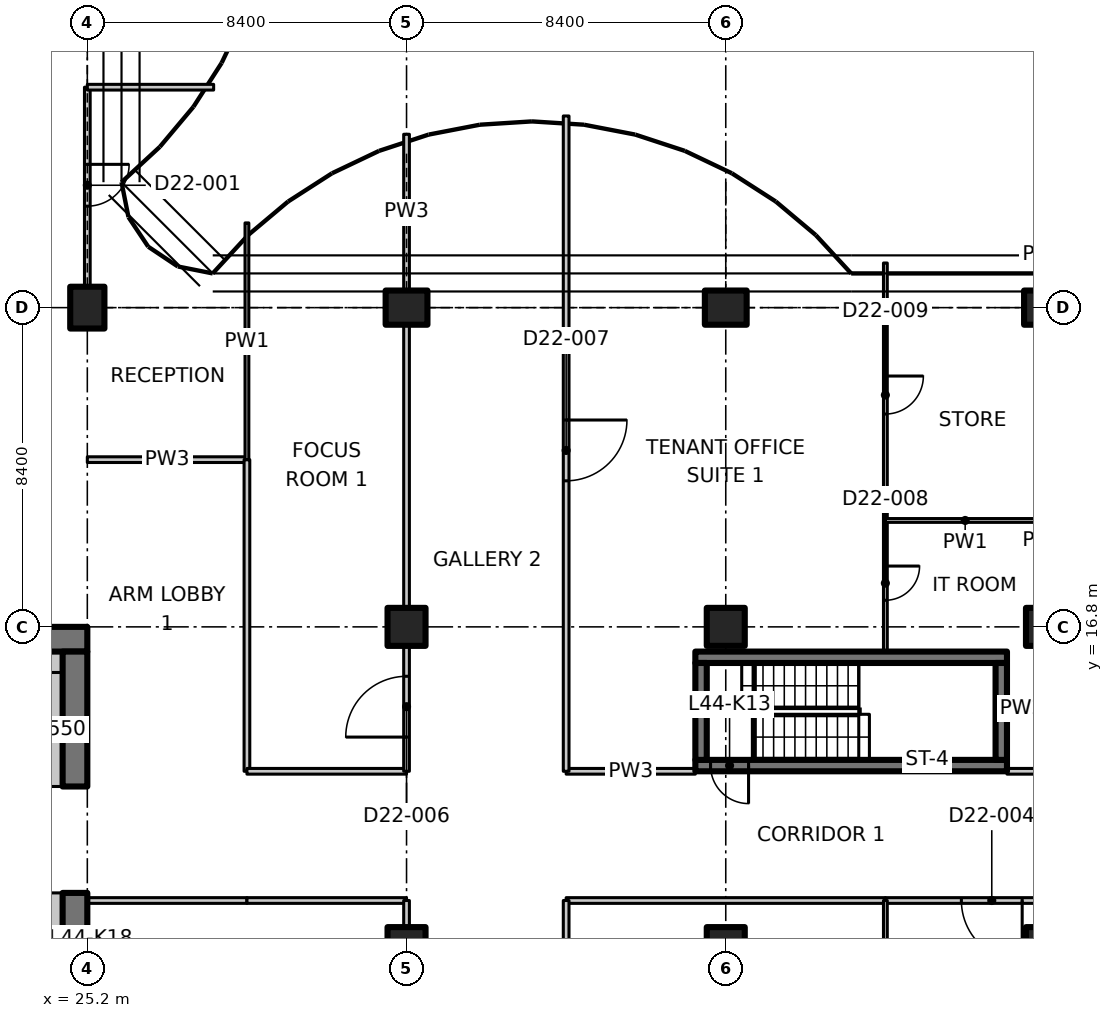
"""IFC4 building model, lengths in metres.
Left out: names, types, materials, properties, quantities, classifications, styles, units other than length and angle.
Written with IfcOpenShell. Run it as: python <this file> out.ifc"""

import sys

from ifc_helpers import new_model, si_unit, direction, frame, frame_2d, origin, origin_2d, place, context, subcontext, project, spatial, polyline, rectangle, outline, extrude, element, fill, save


model = new_model("IFC4")
c1 = context("Model", 3, precision=1e-05, world=origin(), true_north=direction((0.0, 1.0)))
c2 = subcontext(c1, "Body", "Model", "MODEL_VIEW")
j1 = project(units=[si_unit("LENGTHUNIT", "METRE"), si_unit("PLANEANGLEUNIT", "RADIAN")], contexts=[c1])
p1 = place(None, origin())
s1 = spatial("IfcSite", under=j1, at=p1, CompositionType="ELEMENT")
p2 = place(p1, origin())
s2 = spatial("IfcBuilding", under=s1, at=p2, CompositionType="ELEMENT")
p3 = place(p2, frame((0.0, 0.0, 177.6)))
s3 = spatial("IfcBuildingStorey", under=s2, at=p3, CompositionType="ELEMENT", Elevation=177.6)
p4 = place(p3, frame((25.2, 25.2, 0.0), z_axis=(0.0, 0.0, 1.0), x_axis=(1.0, 0.0, 0.0)))
e1 = element("IfcColumn", 1, at=p4, inside=s3, PredefinedType="COLUMN", context=c2, shape_type="SweptSolid", body=[
    extrude(rectangle(XDim=0.9, YDim=1.1, at=origin_2d()), origin(), (0.0, 0.0, 1.0), 3.35),
])
for number, where, z_axis, x_axis in (
    (2, (33.6, 8.4, 0.0), (0.0, 0.0, 1.0), (1.0, 0.0, 0.0)),
    (3, (33.6, 16.8, 0.0), (0.0, 0.0, 1.0), (1.0, 0.0, 0.0)),
):
    element("IfcColumn", number, at=place(p3, frame(where, z_axis=z_axis, x_axis=x_axis)), inside=s3, PredefinedType="COLUMN", context=c2, shape_type="SweptSolid", body=[
        extrude(rectangle(XDim=1.0, YDim=1.0, at=origin_2d()), origin(), (0.0, 0.0, 1.0), 3.35),
    ])
p5 = place(p3, frame((33.6, 25.2, 0.0), z_axis=(0.0, 0.0, 1.0), x_axis=(0.0, 1.0, 0.0)))
e4 = element("IfcColumn", 4, at=p5, inside=s3, PredefinedType="COLUMN", context=c2, shape_type="SweptSolid", body=[
    extrude(rectangle(XDim=0.9, YDim=1.1, at=origin_2d()), origin(), (0.0, 0.0, 1.0), 3.35),
])
for number, where, z_axis, x_axis in (
    (5, (42.0, 8.4, 0.0), (0.0, 0.0, 1.0), (1.0, 0.0, 0.0)),
    (6, (42.0, 16.8, 0.0), (0.0, 0.0, 1.0), (1.0, 0.0, 0.0)),
):
    element("IfcColumn", number, at=place(p3, frame(where, z_axis=z_axis, x_axis=x_axis)), inside=s3, PredefinedType="COLUMN", context=c2, shape_type="SweptSolid", body=[
        extrude(rectangle(XDim=1.0, YDim=1.0, at=origin_2d()), origin(), (0.0, 0.0, 1.0), 3.35),
    ])
p6 = place(p3, frame((42.0, 25.2, 0.0), z_axis=(0.0, 0.0, 1.0), x_axis=(0.0, 1.0, 0.0)))
e7 = element("IfcColumn", 7, at=p6, inside=s3, PredefinedType="COLUMN", context=c2, shape_type="SweptSolid", body=[
    extrude(rectangle(XDim=0.9, YDim=1.1, at=origin_2d()), origin(), (0.0, 0.0, 1.0), 3.35),
])
for number, where, z_axis, x_axis in (
    (8, (50.4, 8.4, 0.0), (0.0, 0.0, 1.0), (1.0, 0.0, 0.0)),
    (9, (50.4, 16.8, 0.0), (0.0, 0.0, 1.0), (1.0, 0.0, 0.0)),
):
    element("IfcColumn", number, at=place(p3, frame(where, z_axis=z_axis, x_axis=x_axis)), inside=s3, PredefinedType="COLUMN", context=c2, shape_type="SweptSolid", body=[
        extrude(rectangle(XDim=1.0, YDim=1.0, at=origin_2d()), origin(), (0.0, 0.0, 1.0), 3.35),
    ])
p7 = place(p3, frame((50.4, 25.2, 0.0), z_axis=(0.0, 0.0, 1.0), x_axis=(0.0, 1.0, 0.0)))
e10 = element("IfcColumn", 10, at=p7, inside=s3, PredefinedType="COLUMN", context=c2, shape_type="SweptSolid", body=[
    extrude(rectangle(XDim=0.9, YDim=1.1, at=origin_2d()), origin(), (0.0, 0.0, 1.0), 3.35),
])
p8 = place(p3, frame((23.8, 16.475, 0.0), z_axis=(0.0, 0.0, 1.0), x_axis=(1.0, 0.0, 0.0)))
e11 = element("IfcWall", 11, at=p8, inside=s3, PredefinedType="SHEAR", context=c2, shape_type="SweptSolid", body=[
    extrude(rectangle(XDim=1.4, YDim=0.65, at=frame_2d((0.7, 0.0))), origin(), (0.0, 0.0, 1.0), 3.35),
])
p9 = place(p3, frame((24.875, 0.65, 0.0), z_axis=(0.0, 0.0, 1.0), x_axis=(0.0, 1.0, 0.0)))
e12 = element("IfcWall", 12, at=p9, inside=s3, PredefinedType="SHEAR", context=c2, shape_type="SweptSolid", body=[
    extrude(rectangle(XDim=9.15, YDim=0.65, at=frame_2d((4.575, 0.0))), origin(), (0.0, 0.0, 1.0), 3.35),
])
p10 = place(p3, frame((24.875, 12.6, 0.0), z_axis=(0.0, 0.0, 1.0), x_axis=(0.0, 1.0, 0.0)))
e13 = element("IfcWall", 13, at=p10, inside=s3, PredefinedType="SHEAR", context=c2, shape_type="SweptSolid", body=[
    extrude(rectangle(XDim=3.55, YDim=0.65, at=frame_2d((1.775, 0.0))), origin(), (0.0, 0.0, 1.0), 3.35),
])
p11 = place(p3, frame((24.275, 12.6, 0.0), z_axis=(0.0, 0.0, 1.0), x_axis=(0.0, 1.0, 0.0)))
e14 = element("IfcWall", 14, at=p11, inside=s3, PredefinedType="PARTITIONING", context=c2, shape_type="SweptSolid", body=[
    extrude(rectangle(XDim=3.0, YDim=0.55, at=frame_2d((1.5, 0.0))), origin(), (0.0, 0.0, 1.0), 3.35),
])
p12 = place(p3, frame((23.8, 15.875, 0.0), z_axis=(0.0, 0.0, 1.0), x_axis=(1.0, 0.0, 0.0)))
e15 = element("IfcWall", 15, at=p12, inside=s3, PredefinedType="PARTITIONING", context=c2, shape_type="SweptSolid", body=[
    extrude(rectangle(XDim=0.75, YDim=0.55, at=frame_2d((0.375, 0.0))), origin(), (0.0, 0.0, 1.0), 3.35),
])
p13 = place(p3, frame((49.4, 13.15, 0.0), z_axis=(0.0, 0.0, 1.0), x_axis=(-1.0, 0.0, 0.0)))
e16 = element("IfcWall", 16, at=p13, inside=s3, PredefinedType="SHEAR", context=c2, shape_type="SweptSolid", body=[
    extrude(rectangle(XDim=8.2, YDim=0.3, at=frame_2d((4.1, 0.0))), origin(), (0.0, 0.0, 1.0), 3.35),
])
p14 = place(p13, frame((6.8, 0.0, 0.0)))
e17 = element("IfcOpeningElement", 17, at=p14, cuts=e16, PredefinedType="OPENING", context=c2, shape_type="SweptSolid", body=[
    extrude(rectangle(XDim=1.0, YDim=2.1, at=frame_2d((0.5, 1.05))), frame((0.0, 0.16, 0.0), z_axis=(0.0, -1.0, 0.0), x_axis=(1.0, 0.0, 0.0)), (0.0, 0.0, 1.0), 0.32),
])
p15 = place(p3, frame((41.2, 16.0, 0.0), z_axis=(0.0, 0.0, 1.0), x_axis=(1.0, 0.0, 0.0)))
e18 = element("IfcWall", 18, at=p15, inside=s3, PredefinedType="SHEAR", context=c2, shape_type="SweptSolid", body=[
    extrude(rectangle(XDim=8.2, YDim=0.3, at=frame_2d((4.1, 0.0))), origin(), (0.0, 0.0, 1.0), 3.35),
])
for number, where, z_axis, x_axis in (
    (19, (41.35, 13.3, 0.0), (0.0, 0.0, 1.0), (0.0, 1.0, 0.0)),
    (20, (49.25, 13.3, 0.0), (0.0, 0.0, 1.0), (0.0, 1.0, 0.0)),
):
    element("IfcWall", number, at=place(p3, frame(where, z_axis=z_axis, x_axis=x_axis)), inside=s3, PredefinedType="SHEAR", context=c2, shape_type="SweptSolid", body=[
        extrude(rectangle(XDim=2.55, YDim=0.3, at=frame_2d((1.275, 0.0))), origin(), (0.0, 0.0, 1.0), 3.35),
    ])
p16 = place(p3, frame((24.275, 4.35, 0.0), z_axis=(0.0, 0.0, 1.0), x_axis=(0.0, 1.0, 0.0)))
e21 = element("IfcWall", 21, at=p16, inside=s3, PredefinedType="PARTITIONING", context=c2, shape_type="SweptSolid", body=[
    extrude(rectangle(XDim=5.45, YDim=0.55, at=frame_2d((2.725, 0.0))), origin(), (0.0, 0.0, 1.0), 3.35),
])
for number, where, z_axis, x_axis in (
    (22, (25.2, 21.2, 0.0), (0.0, 0.0, 1.0), (1.0, 0.0, 0.0)),
    (23, (29.4, 9.6, 0.0), (0.0, 0.0, 1.0), (-1.0, 0.0, 0.0)),
):
    element("IfcWall", number, at=place(p3, frame(where, z_axis=z_axis, x_axis=x_axis)), inside=s3, PredefinedType="PARTITIONING", context=c2, shape_type="SweptSolid", body=[
        extrude(rectangle(XDim=4.2, YDim=0.15, at=frame_2d((2.1, 0.0))), origin(), (0.0, 0.0, 1.0), 3.33),
    ])
p17 = place(p3, frame((29.4, 21.2, 0.0), z_axis=(0.0, 0.0, 1.0), x_axis=(0.0, -1.0, 0.0)))
e24 = element("IfcWall", 24, at=p17, inside=s3, PredefinedType="PARTITIONING", context=c2, shape_type="SweptSolid", body=[
    extrude(rectangle(XDim=8.2, YDim=0.15, at=frame_2d((4.1, 0.0))), origin(), (0.0, 0.0, 1.0), 3.33),
])
p18 = place(p3, frame((29.4, 27.429, 0.0), z_axis=(0.0, 0.0, 1.0), x_axis=(0.0, -1.0, 0.0)))
e25 = element("IfcWall", 25, at=p18, inside=s3, PredefinedType="PARTITIONING", context=c2, shape_type="SweptSolid", body=[
    extrude(outline(polyline([(0.0, 0.0), (6.229, 0.0), (6.229, 3.33), (2.679, 3.33), (2.677, 2.98), (1.781, 2.98), (1.779, 3.33), (0.154, 3.33), (0.0, 3.33), (0.0, 0.0)])), frame((0.0, 0.05, 0.0), z_axis=(0.0, -1.0, 0.0), x_axis=(1.0, 0.0, 0.0)), (0.0, 0.0, 1.0), 0.1),
])
p19 = place(p3, frame((25.2, 31.0, 0.0), z_axis=(0.0, 0.0, 1.0), x_axis=(0.0, -1.0, 0.0)))
e26 = element("IfcWall", 26, at=p19, inside=s3, PredefinedType="PARTITIONING", context=c2, shape_type="SweptSolid", body=[
    extrude(outline(polyline([(0.0, 0.0), (5.23, 0.0), (5.23, 2.98), (0.0, 2.98), (0.0, 0.0)])), frame((0.0, 0.075, 0.0), z_axis=(0.0, -1.0, 0.0), x_axis=(1.0, 0.0, 0.0)), (0.0, 0.0, 1.0), 0.15),
])
p20 = place(p19, frame((2.03, 0.0, 0.0)))
e27 = element("IfcOpeningElement", 27, at=p20, cuts=e26, PredefinedType="OPENING", context=c2, shape_type="SweptSolid", body=[
    extrude(rectangle(XDim=1.1, YDim=2.1, at=frame_2d((0.55, 1.05))), frame((0.0, 0.085, 0.0), z_axis=(0.0, -1.0, 0.0), x_axis=(1.0, 0.0, 0.0)), (0.0, 0.0, 1.0), 0.17),
])
p21 = place(p3, frame((25.2, 31.0, 0.0), z_axis=(0.0, 0.0, 1.0), x_axis=(1.0, 0.0, 0.0)))
e28 = element("IfcWall", 28, at=p21, inside=s3, PredefinedType="PARTITIONING", context=c2, shape_type="SweptSolid", body=[
    extrude(rectangle(XDim=3.324, YDim=0.15, at=frame_2d((1.662, 0.0))), origin(), (0.0, 0.0, 1.0), 2.98),
])
p22 = place(p3, frame((33.6, 9.6, 0.0), z_axis=(0.0, 0.0, 1.0), x_axis=(-1.0, 0.0, 0.0)))
e29 = element("IfcWall", 29, at=p22, inside=s3, PredefinedType="PARTITIONING", context=c2, shape_type="SweptSolid", body=[
    extrude(rectangle(XDim=4.2, YDim=0.15, at=frame_2d((2.1, 0.0))), origin(), (0.0, 0.0, 1.0), 3.33),
])
p23 = place(p3, frame((46.2, 9.6, 0.0), z_axis=(0.0, 0.0, 1.0), x_axis=(-1.0, 0.0, 0.0)))
e30 = element("IfcWall", 30, at=p23, inside=s3, PredefinedType="PARTITIONING", context=c2, shape_type="SweptSolid", body=[
    extrude(rectangle(XDim=8.4, YDim=0.15, at=frame_2d((4.2, 0.0))), origin(), (0.0, 0.0, 1.0), 3.33),
])
p24 = place(p3, frame((54.6, 9.6, 0.0), z_axis=(0.0, 0.0, 1.0), x_axis=(-1.0, 0.0, 0.0)))
e31 = element("IfcWall", 31, at=p24, inside=s3, PredefinedType="PARTITIONING", context=c2, shape_type="SweptSolid", body=[
    extrude(rectangle(XDim=8.4, YDim=0.15, at=frame_2d((4.2, 0.0))), origin(), (0.0, 0.0, 1.0), 3.33),
])
p25 = place(p24, frame((4.8, 0.0, 0.0)))
e32 = element("IfcOpeningElement", 32, at=p25, cuts=e31, PredefinedType="OPENING", context=c2, shape_type="SweptSolid", body=[
    extrude(rectangle(XDim=1.6, YDim=2.1, at=frame_2d((0.8, 1.05))), frame((0.0, 0.085, 0.0), z_axis=(0.0, -1.0, 0.0), x_axis=(1.0, 0.0, 0.0)), (0.0, 0.0, 1.0), 0.17),
])
p26 = place(p3, frame((29.4, 13.0, 0.0), z_axis=(0.0, 0.0, 1.0), x_axis=(1.0, 0.0, 0.0)))
e33 = element("IfcWall", 33, at=p26, inside=s3, PredefinedType="PARTITIONING", context=c2, shape_type="SweptSolid", body=[
    extrude(rectangle(XDim=4.2, YDim=0.15, at=frame_2d((2.1, 0.0))), origin(), (0.0, 0.0, 1.0), 3.33),
])
p27 = place(p3, frame((37.8, 13.0, 0.0), z_axis=(0.0, 0.0, 1.0), x_axis=(1.0, 0.0, 0.0)))
e34 = element("IfcWall", 34, at=p27, inside=s3, PredefinedType="PARTITIONING", context=c2, shape_type="SweptSolid", body=[
    extrude(rectangle(XDim=3.4, YDim=0.15, at=frame_2d((1.7, 0.0))), origin(), (0.0, 0.0, 1.0), 3.33),
])
p28 = place(p3, frame((49.4, 13.0, 0.0), z_axis=(0.0, 0.0, 1.0), x_axis=(1.0, 0.0, 0.0)))
e35 = element("IfcWall", 35, at=p28, inside=s3, PredefinedType="PARTITIONING", context=c2, shape_type="SweptSolid", body=[
    extrude(rectangle(XDim=1.0, YDim=0.15, at=frame_2d((0.5, 0.0))), origin(), (0.0, 0.0, 1.0), 3.33),
])
p29 = place(p3, frame((33.6, 8.92, 0.0), z_axis=(0.0, 0.0, 1.0), x_axis=(0.0, 1.0, 0.0)))
e36 = element("IfcWall", 36, at=p29, inside=s3, PredefinedType="PARTITIONING", context=c2, shape_type="SweptSolid", body=[
    extrude(rectangle(XDim=0.68, YDim=0.15, at=frame_2d((0.34, 0.0))), origin(), (0.0, 0.0, 1.0), 3.33),
])
p30 = place(p3, frame((37.8, 9.6, 0.0), z_axis=(0.0, 0.0, 1.0), x_axis=(0.0, -1.0, 0.0)))
e37 = element("IfcWall", 37, at=p30, inside=s3, PredefinedType="PARTITIONING", context=c2, shape_type="SweptSolid", body=[
    extrude(outline(polyline([(0.0, 0.0), (10.965, 0.0), (10.965, 3.33), (10.7, 3.33), (10.05, 3.33), (10.048, 2.98), (9.152, 2.98), (9.15, 3.33), (0.0, 3.33), (0.0, 0.0)])), frame((0.0, 0.075, 0.0), z_axis=(0.0, -1.0, 0.0), x_axis=(1.0, 0.0, 0.0)), (0.0, 0.0, 1.0), 0.15),
])
p31 = place(p30, frame((4.5, 0.0, 0.0)))
e38 = element("IfcOpeningElement", 38, at=p31, cuts=e37, PredefinedType="OPENING", context=c2, shape_type="SweptSolid", body=[
    extrude(rectangle(XDim=1.6, YDim=2.1, at=frame_2d((0.8, 1.05))), frame((0.0, 0.085, 0.0), z_axis=(0.0, -1.0, 0.0), x_axis=(1.0, 0.0, 0.0)), (0.0, 0.0, 1.0), 0.17),
])
p32 = place(p3, frame((46.2, 9.6, 0.0), z_axis=(0.0, 0.0, 1.0), x_axis=(0.0, -1.0, 0.0)))
e39 = element("IfcWall", 39, at=p32, inside=s3, PredefinedType="PARTITIONING", context=c2, shape_type="SweptSolid", body=[
    extrude(outline(polyline([(0.0, 0.0), (10.965, 0.0), (10.965, 3.33), (10.7, 3.33), (10.05, 3.33), (10.048, 2.98), (9.152, 2.98), (9.15, 3.33), (0.0, 3.33), (0.0, 0.0)])), frame((0.0, 0.05, 0.0), z_axis=(0.0, -1.0, 0.0), x_axis=(1.0, 0.0, 0.0)), (0.0, 0.0, 1.0), 0.1),
])
p33 = place(p3, frame((33.6, 13.0, 0.0), z_axis=(0.0, 0.0, 1.0), x_axis=(0.0, 1.0, 0.0)))
e40 = element("IfcWall", 40, at=p33, inside=s3, PredefinedType="PARTITIONING", context=c2, shape_type="SweptSolid", body=[
    extrude(rectangle(XDim=3.28, YDim=0.15, at=frame_2d((1.64, 0.0))), origin(), (0.0, 0.0, 1.0), 3.33),
])
p34 = place(p33, frame((0.9, 0.0, 0.0)))
e41 = element("IfcOpeningElement", 41, at=p34, cuts=e40, PredefinedType="OPENING", context=c2, shape_type="SweptSolid", body=[
    extrude(rectangle(XDim=1.6, YDim=2.1, at=frame_2d((0.8, 1.05))), frame((0.0, 0.085, 0.0), z_axis=(0.0, -1.0, 0.0), x_axis=(1.0, 0.0, 0.0)), (0.0, 0.0, 1.0), 0.17),
])
p35 = place(p3, frame((33.6, 17.32, 0.0), z_axis=(0.0, 0.0, 1.0), x_axis=(0.0, 1.0, 0.0)))
e42 = element("IfcWall", 42, at=p35, inside=s3, PredefinedType="PARTITIONING", context=c2, shape_type="SweptSolid", body=[
    extrude(rectangle(XDim=7.41, YDim=0.15, at=frame_2d((3.705, 0.0))), origin(), (0.0, 0.0, 1.0), 3.33),
])
p36 = place(p3, frame((33.6, 25.67, 0.0), z_axis=(0.0, 0.0, 1.0), x_axis=(0.0, 1.0, 0.0)))
e43 = element("IfcWall", 43, at=p36, inside=s3, PredefinedType="PARTITIONING", context=c2, shape_type="SweptSolid", body=[
    extrude(rectangle(XDim=4.092, YDim=0.15, at=frame_2d((2.046, 0.0))), origin(), (0.0, 0.0, 1.0), 2.98),
])
p37 = place(p3, frame((37.8, 30.243, 0.0), z_axis=(0.0, 0.0, 1.0), x_axis=(0.0, -1.0, 0.0)))
e44 = element("IfcWall", 44, at=p37, inside=s3, PredefinedType="PARTITIONING", context=c2, shape_type="SweptSolid", body=[
    extrude(outline(polyline([(0.0, 0.0), (17.243, 0.0), (17.243, 3.33), (5.493, 3.33), (5.491, 2.98), (4.595, 2.98), (4.593, 3.33), (0.0, 3.33), (0.0, 0.0)])), frame((0.0, 0.075, 0.0), z_axis=(0.0, -1.0, 0.0), x_axis=(1.0, 0.0, 0.0)), (0.0, 0.0, 1.0), 0.15),
])
p38 = place(p37, frame((8.0, 0.0, 0.0)))
e45 = element("IfcOpeningElement", 45, at=p38, cuts=e44, PredefinedType="OPENING", context=c2, shape_type="SweptSolid", body=[
    extrude(rectangle(XDim=1.6, YDim=2.1, at=frame_2d((0.8, 1.05))), frame((0.0, 0.085, 0.0), z_axis=(0.0, -1.0, 0.0), x_axis=(1.0, 0.0, 0.0)), (0.0, 0.0, 1.0), 0.17),
])
p39 = place(p3, frame((46.2, 19.6, 0.0), z_axis=(0.0, 0.0, 1.0), x_axis=(0.0, -1.0, 0.0)))
e46 = element("IfcWall", 46, at=p39, inside=s3, PredefinedType="PARTITIONING", context=c2, shape_type="SweptSolid", body=[
    extrude(rectangle(XDim=3.45, YDim=0.1, at=frame_2d((1.725, 0.0))), origin(), (0.0, 0.0, 1.0), 3.33),
])
p40 = place(p39, frame((1.2, 0.0, 0.0)))
e47 = element("IfcOpeningElement", 47, at=p40, cuts=e46, PredefinedType="OPENING", context=c2, shape_type="SweptSolid", body=[
    extrude(rectangle(XDim=0.9, YDim=2.1, at=frame_2d((0.45, 1.05))), frame((0.0, 0.06, 0.0), z_axis=(0.0, -1.0, 0.0), x_axis=(1.0, 0.0, 0.0)), (0.0, 0.0, 1.0), 0.12),
])
p41 = place(p3, frame((46.2, 26.374, 0.0), z_axis=(0.0, 0.0, 1.0), x_axis=(0.0, -1.0, 0.0)))
e48 = element("IfcWall", 48, at=p41, inside=s3, PredefinedType="PARTITIONING", context=c2, shape_type="SweptSolid", body=[
    extrude(outline(polyline([(0.0, 0.0), (6.774, 0.0), (6.774, 3.33), (1.624, 3.33), (1.622, 2.98), (0.726, 2.98), (0.724, 3.33), (0.074, 3.33), (0.0, 3.33), (0.0, 0.0)])), frame((0.0, 0.05, 0.0), z_axis=(0.0, -1.0, 0.0), x_axis=(1.0, 0.0, 0.0)), (0.0, 0.0, 1.0), 0.1),
])
p42 = place(p41, frame((2.974, 0.0, 0.0)))
e49 = element("IfcOpeningElement", 49, at=p42, cuts=e48, PredefinedType="OPENING", context=c2, shape_type="SweptSolid", body=[
    extrude(rectangle(XDim=1.0, YDim=2.1, at=frame_2d((0.5, 1.05))), frame((0.0, 0.06, 0.0), z_axis=(0.0, -1.0, 0.0), x_axis=(1.0, 0.0, 0.0)), (0.0, 0.0, 1.0), 0.12),
])
p43 = place(p3, frame((46.2, 19.6, 0.0), z_axis=(0.0, 0.0, 1.0), x_axis=(1.0, 0.0, 0.0)))
e50 = element("IfcWall", 50, at=p43, inside=s3, PredefinedType="PARTITIONING", context=c2, shape_type="SweptSolid", body=[
    extrude(rectangle(XDim=4.2, YDim=0.1, at=frame_2d((2.1, 0.0))), origin(), (0.0, 0.0, 1.0), 3.33),
])
p44 = place(p14, origin())
e51 = element("IfcDoor", 51, at=p44, inside=s3, OperationType="SINGLE_SWING_RIGHT", PredefinedType="DOOR", context=c2, shape_type="SweptSolid", body=[
    extrude(rectangle(XDim=1.0, YDim=2.1, at=frame_2d((0.5, 1.05))), frame((0.0, 0.025, 0.0), z_axis=(0.0, -1.0, 0.0), x_axis=(1.0, 0.0, 0.0)), (0.0, 0.0, 1.0), 0.05),
])
fill(e17, e51)
p45 = place(p20, origin())
e52 = element("IfcDoor", 52, at=p45, inside=s3, OperationType="SINGLE_SWING_RIGHT", PredefinedType="DOOR", context=c2, shape_type="SweptSolid", body=[
    extrude(rectangle(XDim=1.1, YDim=2.1, at=frame_2d((0.55, 1.05))), frame((0.0, 0.025, 0.0), z_axis=(0.0, -1.0, 0.0), x_axis=(1.0, 0.0, 0.0)), (0.0, 0.0, 1.0), 0.05),
])
fill(e27, e52)
p46 = place(p25, origin())
e53 = element("IfcDoor", 53, at=p46, inside=s3, OperationType="DOUBLE_DOOR_SINGLE_SWING", PredefinedType="DOOR", context=c2, shape_type="SweptSolid", body=[
    extrude(rectangle(XDim=1.6, YDim=2.1, at=frame_2d((0.8, 1.05))), frame((0.0, 0.025, 0.0), z_axis=(0.0, -1.0, 0.0), x_axis=(1.0, 0.0, 0.0)), (0.0, 0.0, 1.0), 0.05),
])
fill(e32, e53)
p47 = place(p34, origin())
e54 = element("IfcDoor", 54, at=p47, inside=s3, OperationType="DOUBLE_DOOR_SINGLE_SWING", PredefinedType="DOOR", context=c2, shape_type="SweptSolid", body=[
    extrude(rectangle(XDim=1.6, YDim=2.1, at=frame_2d((0.8, 1.05))), frame((0.0, 0.025, 0.0), z_axis=(0.0, -1.0, 0.0), x_axis=(1.0, 0.0, 0.0)), (0.0, 0.0, 1.0), 0.05),
])
fill(e41, e54)
p48 = place(p38, origin())
e55 = element("IfcDoor", 55, at=p48, inside=s3, OperationType="DOUBLE_DOOR_SINGLE_SWING", PredefinedType="DOOR", context=c2, shape_type="SweptSolid", body=[
    extrude(rectangle(XDim=1.6, YDim=2.1, at=frame_2d((0.8, 1.05))), frame((0.0, 0.025, 0.0), z_axis=(0.0, -1.0, 0.0), x_axis=(1.0, 0.0, 0.0)), (0.0, 0.0, 1.0), 0.05),
])
fill(e45, e55)
p49 = place(p40, origin())
e56 = element("IfcDoor", 56, at=p49, inside=s3, OperationType="SINGLE_SWING_LEFT", PredefinedType="DOOR", context=c2, shape_type="SweptSolid", body=[
    extrude(rectangle(XDim=0.9, YDim=2.1, at=frame_2d((0.45, 1.05))), frame((0.0, 0.025, 0.0), z_axis=(0.0, -1.0, 0.0), x_axis=(1.0, 0.0, 0.0)), (0.0, 0.0, 1.0), 0.05),
])
fill(e47, e56)
p50 = place(p42, origin())
e57 = element("IfcDoor", 57, at=p50, inside=s3, OperationType="SINGLE_SWING_LEFT", PredefinedType="DOOR", context=c2, shape_type="SweptSolid", body=[
    extrude(rectangle(XDim=1.0, YDim=2.1, at=frame_2d((0.5, 1.05))), frame((0.0, 0.025, 0.0), z_axis=(0.0, -1.0, 0.0), x_axis=(1.0, 0.0, 0.0)), (0.0, 0.0, 1.0), 0.05),
])
fill(e49, e57)
save(model, sys.argv[1])
